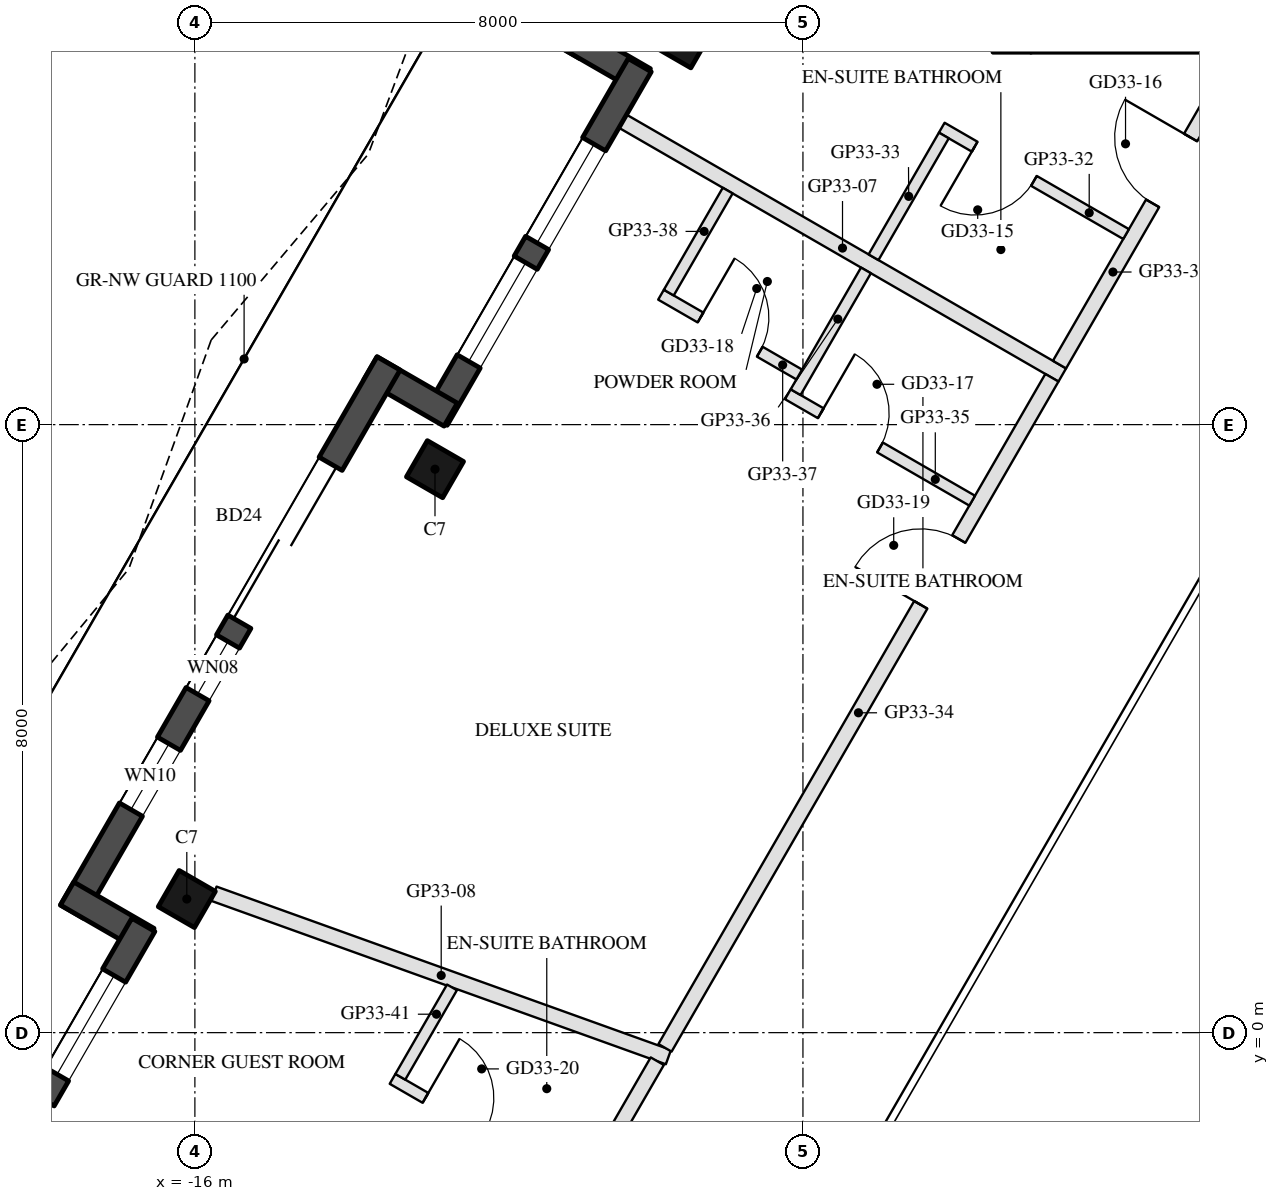
"""IFC4 building model, lengths in metres.
Left out: names, types, materials, properties, quantities, classifications, styles, units other than length and angle.
Written with IfcOpenShell. Run it as: python <this file> out.ifc"""

import sys

from ifc_helpers import new_model, si_unit, direction, frame, frame_2d, origin, origin_2d, place, context, subcontext, project, spatial, rectangle, hollow_rectangle, extrude, boolean, halfspace, element, fill, save


model = new_model("IFC4")
c1 = context("Model", 3, precision=1e-05, world=origin(), true_north=direction((0.0, 1.0)))
c2 = subcontext(c1, "Body", "Model", "MODEL_VIEW")
j1 = project(units=[si_unit("LENGTHUNIT", "METRE"), si_unit("PLANEANGLEUNIT", "RADIAN")], contexts=[c1])
p1 = place(None, origin())
s1 = spatial("IfcSite", under=j1, at=p1, CompositionType="ELEMENT")
p2 = place(p1, origin())
s2 = spatial("IfcBuilding", under=s1, at=p2, CompositionType="ELEMENT")
p3 = place(p2, frame((0.0, 0.0, 317.0)))
s3 = spatial("IfcBuildingStorey", under=s2, at=p3, CompositionType="ELEMENT", Elevation=317.0)
p4 = place(p3, frame((-9.576, 13.07, 0.0), z_axis=(0.0, 0.0, 1.0), x_axis=(0.5, 0.866025403784, 0.0)))
e1 = element("IfcColumn", 1, at=p4, inside=s3, PredefinedType="COLUMN", context=c2, shape_type="SweptSolid", body=[
    boolean("DIFFERENCE", extrude(hollow_rectangle(XDim=0.55, YDim=0.55, WallThickness=0.025, at=origin_2d()), origin(), (0.0, 0.0, 1.0), 3.7), halfspace(frame((0.0, 0.0, 3.666), z_axis=(0.0, 0.0, 1.0), x_axis=(1.0, 0.0, 0.0)), False)),
])
p5 = place(p3, frame((-12.841, 7.414, 0.0), z_axis=(0.0, 0.0, 1.0), x_axis=(0.5, 0.866025403784, 0.0)))
e2 = element("IfcColumn", 2, at=p5, inside=s3, PredefinedType="COLUMN", context=c2, shape_type="SweptSolid", body=[
    boolean("DIFFERENCE", extrude(hollow_rectangle(XDim=0.55, YDim=0.55, WallThickness=0.025, at=origin_2d()), origin(), (0.0, 0.0, 1.0), 3.7), halfspace(frame((0.0, 0.0, 3.668), z_axis=(0.0, 0.0, 1.0), x_axis=(1.0, 0.0, 0.0)), False)),
])
p6 = place(p3, frame((-16.106, 1.758, 0.0), z_axis=(0.0, 0.0, 1.0), x_axis=(0.5, 0.866025403784, 0.0)))
e3 = element("IfcColumn", 3, at=p6, inside=s3, PredefinedType="COLUMN", context=c2, shape_type="SweptSolid", body=[
    boolean("DIFFERENCE", extrude(hollow_rectangle(XDim=0.55, YDim=0.55, WallThickness=0.025, at=origin_2d()), origin(), (0.0, 0.0, 1.0), 3.7), halfspace(frame((0.0, 0.0, 3.666), z_axis=(0.0, 0.0, 1.0), x_axis=(1.0, 0.0, 0.0)), False)),
])
p7 = place(p3, frame((-6.125, 21.497, 0.0), z_axis=(0.0, 0.0, 1.0), x_axis=(-0.500002137087, -0.866024169933, 0.0)))
e4 = element("IfcWall", 4, at=p7, inside=s3, PredefinedType="SOLIDWALL", context=c2, shape_type="SweptSolid", body=[
    extrude(rectangle(XDim=9.924, YDim=0.35, at=frame_2d((4.962, 0.0))), origin(), (0.0, 0.0, 1.0), 3.55),
])
p8 = place(p7, frame((0.381, 0.0, 0.3)))
e5 = element("IfcOpeningElement", 5, at=p8, cuts=e4, PredefinedType="OPENING", context=c2, shape_type="SweptSolid", body=[
    extrude(rectangle(XDim=1.4, YDim=2.65, at=frame_2d((0.7, 1.325))), frame((0.0, 0.185, 0.0), z_axis=(0.0, -1.0, 0.0), x_axis=(1.0, 0.0, 0.0)), (0.0, 0.0, 1.0), 0.37),
])
p9 = place(p7, frame((5.999, 0.0, 0.0)))
e6 = element("IfcOpeningElement", 6, at=p9, cuts=e4, PredefinedType="OPENING", context=c2, shape_type="SweptSolid", body=[
    extrude(rectangle(XDim=2.4, YDim=2.4, at=frame_2d((1.2, 1.2))), frame((0.0, 0.185, 0.0), z_axis=(0.0, -1.0, 0.0), x_axis=(1.0, 0.0, 0.0)), (0.0, 0.0, 1.0), 0.37),
])
p10 = place(p7, frame((3.118, 0.0, 0.3)))
e7 = element("IfcOpeningElement", 7, at=p10, cuts=e4, PredefinedType="OPENING", context=c2, shape_type="SweptSolid", body=[
    extrude(rectangle(XDim=2.5, YDim=2.65, at=frame_2d((1.25, 1.325))), frame((0.0, 0.185, 0.0), z_axis=(0.0, -1.0, 0.0), x_axis=(1.0, 0.0, 0.0)), (0.0, 0.0, 1.0), 0.37),
])
p11 = place(p3, frame((-11.151, 13.142, 0.0), z_axis=(0.0, 0.0, 1.0), x_axis=(0.866005645448, -0.500034220881, 0.0)))
e8 = element("IfcWall", 8, at=p11, inside=s3, PredefinedType="SOLIDWALL", context=c2, shape_type="SweptSolid", body=[
    extrude(rectangle(XDim=1.22, YDim=0.35, at=frame_2d((0.61, 0.0))), origin(), (0.0, 0.0, 1.0), 3.55),
])
p12 = place(p3, frame((-10.147, 12.73, 0.0), z_axis=(0.0, 0.0, 1.0), x_axis=(-0.499996591357, -0.866027371756, 0.0)))
e9 = element("IfcWall", 9, at=p12, inside=s3, PredefinedType="SOLIDWALL", context=c2, shape_type="SweptSolid", body=[
    extrude(rectangle(XDim=5.371, YDim=0.35, at=frame_2d((2.685, 0.0))), origin(), (0.0, 0.0, 1.0), 3.55),
])
p13 = place(p12, frame((1.201, 0.0, 0.3)))
e10 = element("IfcOpeningElement", 10, at=p13, cuts=e9, PredefinedType="OPENING", context=c2, shape_type="SweptSolid", body=[
    extrude(rectangle(XDim=1.5, YDim=2.65, at=frame_2d((0.75, 1.325))), frame((0.0, 0.185, 0.0), z_axis=(0.0, -1.0, 0.0), x_axis=(1.0, 0.0, 0.0)), (0.0, 0.0, 1.0), 0.37),
])
p14 = place(p12, frame((3.001, 0.0, 0.3)))
e11 = element("IfcOpeningElement", 11, at=p14, cuts=e9, PredefinedType="OPENING", context=c2, shape_type="SweptSolid", body=[
    extrude(rectangle(XDim=1.5, YDim=2.65, at=frame_2d((0.75, 1.325))), frame((0.0, 0.185, 0.0), z_axis=(0.0, -1.0, 0.0), x_axis=(1.0, 0.0, 0.0)), (0.0, 0.0, 1.0), 0.37),
])
p15 = place(p3, frame((-12.634, 8.132, 0.0), z_axis=(0.0, 0.0, 1.0), x_axis=(-0.866005645448, 0.500034220881, 0.0)))
e12 = element("IfcWall", 12, at=p15, inside=s3, PredefinedType="SOLIDWALL", context=c2, shape_type="SweptSolid", body=[
    extrude(rectangle(XDim=1.22, YDim=0.35, at=frame_2d((0.61, 0.0))), origin(), (0.0, 0.0, 1.0), 3.55),
])
p16 = place(p3, frame((-13.452, 8.806, 0.0), z_axis=(0.0, 0.0, 1.0), x_axis=(-0.499993893925, -0.8660289291, 0.0)))
e13 = element("IfcWall", 13, at=p16, inside=s3, PredefinedType="SOLIDWALL", context=c2, shape_type="SweptSolid", body=[
    extrude(rectangle(XDim=8.331, YDim=0.35, at=frame_2d((4.165, 0.0))), origin(), (0.0, 0.0, 1.0), 3.55),
])
p17 = place(p16, frame((1.525, 0.0, 0.0)))
e14 = element("IfcOpeningElement", 14, at=p17, cuts=e13, PredefinedType="OPENING", context=c2, shape_type="SweptSolid", body=[
    extrude(rectangle(XDim=2.4, YDim=2.4, at=frame_2d((1.2, 1.2))), frame((0.0, 0.185, 0.0), z_axis=(0.0, -1.0, 0.0), x_axis=(1.0, 0.0, 0.0)), (0.0, 0.0, 1.0), 0.37),
])
p18 = place(p16, frame((4.225, 0.0, 0.3)))
e15 = element("IfcOpeningElement", 15, at=p18, cuts=e13, PredefinedType="OPENING", context=c2, shape_type="SweptSolid", body=[
    extrude(rectangle(XDim=0.8, YDim=2.65, at=frame_2d((0.4, 1.325))), frame((0.0, 0.185, 0.0), z_axis=(0.0, -1.0, 0.0), x_axis=(1.0, 0.0, 0.0)), (0.0, 0.0, 1.0), 0.37),
])
p19 = place(p16, frame((5.779, 0.0, 0.3)))
e16 = element("IfcOpeningElement", 16, at=p19, cuts=e13, PredefinedType="OPENING", context=c2, shape_type="SweptSolid", body=[
    extrude(rectangle(XDim=1.0, YDim=2.65, at=frame_2d((0.5, 1.325))), frame((0.0, 0.185, 0.0), z_axis=(0.0, -1.0, 0.0), x_axis=(1.0, 0.0, 0.0)), (0.0, 0.0, 1.0), 0.37),
])
p20 = place(p3, frame((-17.681, 1.83, 0.0), z_axis=(0.0, 0.0, 1.0), x_axis=(0.866092288191, -0.499884134912, 0.0)))
e17 = element("IfcWall", 17, at=p20, inside=s3, PredefinedType="SOLIDWALL", context=c2, shape_type="SweptSolid", body=[
    extrude(rectangle(XDim=1.22, YDim=0.35, at=frame_2d((0.61, 0.0))), origin(), (0.0, 0.0, 1.0), 3.55),
])
p21 = place(p3, frame((-16.678, 1.418, 0.0), z_axis=(0.0, 0.0, 1.0), x_axis=(-0.499996591357, -0.866027371756, 0.0)))
e18 = element("IfcWall", 18, at=p21, inside=s3, PredefinedType="SOLIDWALL", context=c2, shape_type="SweptSolid", body=[
    extrude(rectangle(XDim=5.371, YDim=0.35, at=frame_2d((2.685, 0.0))), origin(), (0.0, 0.0, 1.0), 3.55),
])
p22 = place(p21, frame((2.651, 0.0, 0.0)))
e19 = element("IfcOpeningElement", 19, at=p22, cuts=e18, PredefinedType="OPENING", context=c2, shape_type="SweptSolid", body=[
    extrude(rectangle(XDim=2.4, YDim=2.4, at=frame_2d((1.2, 1.2))), frame((0.0, 0.185, 0.0), z_axis=(0.0, -1.0, 0.0), x_axis=(1.0, 0.0, 0.0)), (0.0, 0.0, 1.0), 0.37),
])
p23 = place(p21, frame((0.77, 0.0, 0.3)))
e20 = element("IfcOpeningElement", 20, at=p23, cuts=e18, PredefinedType="OPENING", context=c2, shape_type="SweptSolid", body=[
    extrude(rectangle(XDim=1.5, YDim=2.65, at=frame_2d((0.75, 1.325))), frame((0.0, 0.185, 0.0), z_axis=(0.0, -1.0, 0.0), x_axis=(1.0, 0.0, 0.0)), (0.0, 0.0, 1.0), 0.37),
])
p24 = place(p3, frame((-5.25, 12.9, 0.0), z_axis=(0.0, 0.0, 1.0), x_axis=(0.0, 1.0, 0.0)))
e21 = element("IfcWall", 21, at=p24, inside=s3, PredefinedType="SHEAR", context=c2, shape_type="SweptSolid", body=[
    extrude(rectangle(XDim=9.283, YDim=0.5, at=frame_2d((4.641, 0.0))), origin(), (0.0, 0.0, 1.0), 3.5),
])
p25 = place(p3, frame((5.0, 13.1, 0.0), z_axis=(0.0, 0.0, 1.0), x_axis=(-1.0, 0.0, 0.0)))
e22 = element("IfcWall", 22, at=p25, inside=s3, PredefinedType="SHEAR", context=c2, shape_type="SweptSolid", body=[
    extrude(rectangle(XDim=10.0, YDim=0.4, at=frame_2d((5.0, 0.0))), origin(), (0.0, 0.0, 1.0), 3.5),
])
p26 = place(p25, frame((3.55, 0.0, 0.0)))
e23 = element("IfcOpeningElement", 23, at=p26, cuts=e22, PredefinedType="OPENING", context=c2, shape_type="SweptSolid", body=[
    extrude(rectangle(XDim=1.1, YDim=2.1, at=frame_2d((0.55, 1.05))), frame((0.0, 0.21, 0.0), z_axis=(0.0, -1.0, 0.0), x_axis=(1.0, 0.0, 0.0)), (0.0, 0.0, 1.0), 0.42),
])
p27 = place(p25, frame((5.85, 0.0, 0.0)))
e24 = element("IfcOpeningElement", 24, at=p27, cuts=e22, PredefinedType="OPENING", context=c2, shape_type="SweptSolid", body=[
    extrude(rectangle(XDim=1.4, YDim=2.1, at=frame_2d((0.7, 1.05))), frame((0.0, 0.21, 0.0), z_axis=(0.0, -1.0, 0.0), x_axis=(1.0, 0.0, 0.0)), (0.0, 0.0, 1.0), 0.42),
])
p28 = place(p3, frame((-10.371, 11.992, 0.0), z_axis=(0.0, 0.0, 1.0), x_axis=(0.866020588255, -0.50000834065, 0.0)))
e25 = element("IfcWall", 25, at=p28, inside=s3, PredefinedType="PARTITIONING", context=c2, shape_type="SweptSolid", body=[
    extrude(rectangle(XDim=6.678, YDim=0.2, at=frame_2d((3.339, 0.0))), origin(), (0.0, 0.0, 1.0), 3.1),
])
p29 = place(p3, frame((-15.749, 1.827, 0.0), z_axis=(0.0, 0.0, 1.0), x_axis=(0.941030372408, -0.3383220924, 0.0)))
e26 = element("IfcWall", 26, at=p29, inside=s3, PredefinedType="PARTITIONING", context=c2, shape_type="SweptSolid", body=[
    extrude(rectangle(XDim=6.353, YDim=0.2, at=frame_2d((3.177, 0.0))), origin(), (0.0, 0.0, 1.0), 3.1),
])
p30 = place(p3, frame((-4.625, 8.79, 0.0), z_axis=(0.0, 0.0, 1.0), x_axis=(0.499964368059, 0.866045974918, 0.0)))
e27 = element("IfcWall", 27, at=p30, inside=s3, PredefinedType="PARTITIONING", context=c2, shape_type="SweptSolid", body=[
    extrude(rectangle(XDim=4.688, YDim=0.2, at=frame_2d((2.344, 0.0))), origin(), (0.0, 0.0, 1.0), 3.1),
])
p31 = place(p30, frame((2.45, 0.0, 0.0)))
e28 = element("IfcOpeningElement", 28, at=p31, cuts=e27, PredefinedType="OPENING", context=c2, shape_type="SweptSolid", body=[
    extrude(rectangle(XDim=1.0, YDim=2.1, at=frame_2d((0.5, 1.05))), frame((0.0, 0.11, 0.0), z_axis=(0.0, -1.0, 0.0), x_axis=(1.0, 0.0, 0.0)), (0.0, 0.0, 1.0), 0.22),
])
p32 = place(p3, frame((-3.749, 10.507, 0.0), z_axis=(0.0, 0.0, 1.0), x_axis=(-0.866034573852, 0.49998411664, 0.0)))
e29 = element("IfcWall", 29, at=p32, inside=s3, PredefinedType="PARTITIONING", context=c2, shape_type="SweptSolid", body=[
    extrude(rectangle(XDim=2.8, YDim=0.15, at=frame_2d((1.4, 0.0))), origin(), (0.0, 0.0, 1.0), 3.55),
])
p33 = place(p32, frame((1.4, 0.0, 0.0)))
e30 = element("IfcOpeningElement", 30, at=p33, cuts=e29, PredefinedType="OPENING", context=c2, shape_type="SweptSolid", body=[
    extrude(rectangle(XDim=0.9, YDim=2.1, at=frame_2d((0.45, 1.05))), frame((0.0, 0.085, 0.0), z_axis=(0.0, -1.0, 0.0), x_axis=(1.0, 0.0, 0.0)), (0.0, 0.0, 1.0), 0.17),
])
p34 = place(p3, frame((-6.146, 11.805, 0.0), z_axis=(0.0, 0.0, 1.0), x_axis=(-0.499985172903, -0.866033964044, 0.0)))
e31 = element("IfcWall", 31, at=p34, inside=s3, PredefinedType="PARTITIONING", context=c2, shape_type="SweptSolid", body=[
    extrude(rectangle(XDim=1.85, YDim=0.15, at=frame_2d((0.925, 0.0))), origin(), (0.0, 0.0, 1.0), 3.1),
])
p35 = place(p3, frame((-9.815, -0.2, 0.0), z_axis=(0.0, 0.0, 1.0), x_axis=(0.499995091154, 0.866028237889, 0.0)))
e32 = element("IfcWall", 32, at=p35, inside=s3, PredefinedType="PARTITIONING", context=c2, shape_type="SweptSolid", body=[
    extrude(rectangle(XDim=10.18, YDim=0.2, at=frame_2d((5.09, 0.0))), origin(), (0.0, 0.0, 1.0), 3.1),
])
p36 = place(p35, frame((6.73, 0.0, 0.0)))
e33 = element("IfcOpeningElement", 33, at=p36, cuts=e32, PredefinedType="OPENING", context=c2, shape_type="SweptSolid", body=[
    extrude(rectangle(XDim=1.0, YDim=2.1, at=frame_2d((0.5, 1.05))), frame((0.0, 0.11, 0.0), z_axis=(0.0, -1.0, 0.0), x_axis=(1.0, 0.0, 0.0)), (0.0, 0.0, 1.0), 0.22),
])
p37 = place(p3, frame((-8.198, 8.4, 0.0), z_axis=(0.0, 0.0, 1.0), x_axis=(0.865996816683, -0.500049511043, 0.0)))
e34 = element("IfcWall", 34, at=p37, inside=s3, PredefinedType="PARTITIONING", context=c2, shape_type="SweptSolid", body=[
    extrude(rectangle(XDim=2.8, YDim=0.15, at=frame_2d((1.4, 0.0))), origin(), (0.0, 0.0, 1.0), 3.1),
])
p38 = place(p37, frame((0.5, 0.0, 0.0)))
e35 = element("IfcOpeningElement", 35, at=p38, cuts=e34, PredefinedType="OPENING", context=c2, shape_type="SweptSolid", body=[
    extrude(rectangle(XDim=0.9, YDim=2.1, at=frame_2d((0.45, 1.05))), frame((0.0, 0.085, 0.0), z_axis=(0.0, -1.0, 0.0), x_axis=(1.0, 0.0, 0.0)), (0.0, 0.0, 1.0), 0.17),
])
p39 = place(p3, frame((-7.171, 10.029, 0.0), z_axis=(0.0, 0.0, 1.0), x_axis=(-0.499985172903, -0.866033964044, 0.0)))
e36 = element("IfcWall", 36, at=p39, inside=s3, PredefinedType="PARTITIONING", context=c2, shape_type="SweptSolid", body=[
    extrude(rectangle(XDim=1.85, YDim=0.15, at=frame_2d((0.925, 0.0))), origin(), (0.0, 0.0, 1.0), 3.1),
])
p40 = place(p3, frame((-9.867, 9.709, 0.0), z_axis=(0.0, 0.0, 1.0), x_axis=(0.866009402589, -0.500027713859, 0.0)))
e37 = element("IfcWall", 37, at=p40, inside=s3, PredefinedType="PARTITIONING", context=c2, shape_type="SweptSolid", body=[
    extrude(rectangle(XDim=2.1, YDim=0.15, at=frame_2d((1.05, 0.0))), origin(), (0.0, 0.0, 1.0), 3.55),
])
p41 = place(p40, frame((0.6, 0.0, 0.0)))
e38 = element("IfcOpeningElement", 38, at=p41, cuts=e37, PredefinedType="OPENING", context=c2, shape_type="SweptSolid", body=[
    extrude(rectangle(XDim=0.9, YDim=2.1, at=frame_2d((0.45, 1.05))), frame((0.0, 0.085, 0.0), z_axis=(0.0, -1.0, 0.0), x_axis=(1.0, 0.0, 0.0)), (0.0, 0.0, 1.0), 0.17),
])
p42 = place(p3, frame((-8.99, 11.079, 0.0), z_axis=(0.0, 0.0, 1.0), x_axis=(-0.500086022567, -0.865975732936, 0.0)))
e39 = element("IfcWall", 39, at=p42, inside=s3, PredefinedType="PARTITIONING", context=c2, shape_type="SweptSolid", body=[
    extrude(rectangle(XDim=1.55, YDim=0.15, at=frame_2d((0.775, 0.0))), origin(), (0.0, 0.0, 1.0), 3.55),
])
p43 = place(p3, frame((-12.269, -4.45, 0.0), z_axis=(0.0, 0.0, 1.0), x_axis=(0.500006955494, 0.866021387991, 0.0)))
e40 = element("IfcWall", 40, at=p43, inside=s3, PredefinedType="PARTITIONING", context=c2, shape_type="SweptSolid", body=[
    extrude(rectangle(XDim=4.705, YDim=0.2, at=frame_2d((2.352, 0.0))), origin(), (0.0, 0.0, 1.0), 3.1),
])
p44 = place(p43, frame((1.237, 0.0, 0.0)))
e41 = element("IfcOpeningElement", 41, at=p44, cuts=e40, PredefinedType="OPENING", context=c2, shape_type="SweptSolid", body=[
    extrude(rectangle(XDim=1.0, YDim=2.1, at=frame_2d((0.5, 1.05))), frame((0.0, 0.11, 0.0), z_axis=(0.0, -1.0, 0.0), x_axis=(1.0, 0.0, 0.0)), (0.0, 0.0, 1.0), 0.22),
])
p45 = place(p3, frame((-13.399, -0.608, 0.0), z_axis=(0.0, 0.0, 1.0), x_axis=(0.866034573852, -0.49998411664, 0.0)))
e42 = element("IfcWall", 42, at=p45, inside=s3, PredefinedType="PARTITIONING", context=c2, shape_type="SweptSolid", body=[
    extrude(rectangle(XDim=2.8, YDim=0.15, at=frame_2d((1.4, 0.0))), origin(), (0.0, 0.0, 1.0), 3.55),
])
p46 = place(p45, frame((0.5, 0.0, 0.0)))
e43 = element("IfcOpeningElement", 43, at=p46, cuts=e42, PredefinedType="OPENING", context=c2, shape_type="SweptSolid", body=[
    extrude(rectangle(XDim=0.9, YDim=2.1, at=frame_2d((0.45, 1.05))), frame((0.0, 0.085, 0.0), z_axis=(0.0, -1.0, 0.0), x_axis=(1.0, 0.0, 0.0)), (0.0, 0.0, 1.0), 0.17),
])
p47 = place(p3, frame((-12.618, 0.595, 0.0), z_axis=(0.0, 0.0, 1.0), x_axis=(-0.499966175448, -0.866044931518, 0.0)))
e44 = element("IfcWall", 44, at=p47, inside=s3, PredefinedType="PARTITIONING", context=c2, shape_type="SweptSolid", body=[
    extrude(rectangle(XDim=1.358, YDim=0.15, at=frame_2d((0.679, 0.0))), origin(), (0.0, 0.0, 1.0), 3.1),
])
p48 = place(p13, origin())
e45 = element("IfcWindow", 45, at=p48, inside=s3, PartitioningType="SINGLE_PANEL", PredefinedType="WINDOW", context=c2, shape_type="SweptSolid", body=[
    extrude(rectangle(XDim=1.5, YDim=2.65, at=frame_2d((0.75, 1.325))), frame((0.0, 0.03, 0.0), z_axis=(0.0, -1.0, 0.0), x_axis=(1.0, 0.0, 0.0)), (0.0, 0.0, 1.0), 0.06),
])
fill(e10, e45)
p49 = place(p14, origin())
e46 = element("IfcWindow", 46, at=p49, inside=s3, PartitioningType="SINGLE_PANEL", PredefinedType="WINDOW", context=c2, shape_type="SweptSolid", body=[
    extrude(rectangle(XDim=1.5, YDim=2.65, at=frame_2d((0.75, 1.325))), frame((0.0, 0.03, 0.0), z_axis=(0.0, -1.0, 0.0), x_axis=(1.0, 0.0, 0.0)), (0.0, 0.0, 1.0), 0.06),
])
fill(e11, e46)
p50 = place(p17, frame((2.4, 0.0, 0.0), z_axis=(0.0, 0.0, 1.0), x_axis=(-1.0, 0.0, 0.0)))
e47 = element("IfcDoor", 47, at=p50, inside=s3, OperationType="SLIDING_TO_LEFT", PredefinedType="DOOR", context=c2, shape_type="SweptSolid", body=[
    extrude(rectangle(XDim=2.4, YDim=2.4, at=frame_2d((1.2, 1.2))), frame((0.0, 0.025, 0.0), z_axis=(0.0, -1.0, 0.0), x_axis=(1.0, 0.0, 0.0)), (0.0, 0.0, 1.0), 0.05),
])
fill(e14, e47)
p51 = place(p18, origin())
e48 = element("IfcWindow", 48, at=p51, inside=s3, PartitioningType="SINGLE_PANEL", PredefinedType="WINDOW", context=c2, shape_type="SweptSolid", body=[
    extrude(rectangle(XDim=0.8, YDim=2.65, at=frame_2d((0.4, 1.325))), frame((0.0, 0.03, 0.0), z_axis=(0.0, -1.0, 0.0), x_axis=(1.0, 0.0, 0.0)), (0.0, 0.0, 1.0), 0.06),
])
fill(e15, e48)
p52 = place(p19, origin())
e49 = element("IfcWindow", 49, at=p52, inside=s3, PartitioningType="SINGLE_PANEL", PredefinedType="WINDOW", context=c2, shape_type="SweptSolid", body=[
    extrude(rectangle(XDim=1.0, YDim=2.65, at=frame_2d((0.5, 1.325))), frame((0.0, 0.03, 0.0), z_axis=(0.0, -1.0, 0.0), x_axis=(1.0, 0.0, 0.0)), (0.0, 0.0, 1.0), 0.06),
])
fill(e16, e49)
p53 = place(p23, origin())
e50 = element("IfcWindow", 50, at=p53, inside=s3, PartitioningType="SINGLE_PANEL", PredefinedType="WINDOW", context=c2, shape_type="SweptSolid", body=[
    extrude(rectangle(XDim=1.5, YDim=2.65, at=frame_2d((0.75, 1.325))), frame((0.0, 0.03, 0.0), z_axis=(0.0, -1.0, 0.0), x_axis=(1.0, 0.0, 0.0)), (0.0, 0.0, 1.0), 0.06),
])
fill(e20, e50)
p54 = place(p33, origin())
e51 = element("IfcDoor", 51, at=p54, inside=s3, OperationType="SINGLE_SWING_RIGHT", PredefinedType="DOOR", context=c2, shape_type="SweptSolid", body=[
    extrude(rectangle(XDim=0.9, YDim=2.1, at=frame_2d((0.45, 1.05))), frame((0.0, 0.025, 0.0), z_axis=(0.0, -1.0, 0.0), x_axis=(1.0, 0.0, 0.0)), (0.0, 0.0, 1.0), 0.05),
])
fill(e30, e51)
p55 = place(p31, origin())
e52 = element("IfcDoor", 52, at=p55, inside=s3, OperationType="SINGLE_SWING_RIGHT", PredefinedType="DOOR", context=c2, shape_type="SweptSolid", body=[
    extrude(rectangle(XDim=1.0, YDim=2.1, at=frame_2d((0.5, 1.05))), frame((0.0, 0.025, 0.0), z_axis=(0.0, -1.0, 0.0), x_axis=(1.0, 0.0, 0.0)), (0.0, 0.0, 1.0), 0.05),
])
fill(e28, e52)
p56 = place(p38, origin())
e53 = element("IfcDoor", 53, at=p56, inside=s3, OperationType="SINGLE_SWING_LEFT", PredefinedType="DOOR", context=c2, shape_type="SweptSolid", body=[
    extrude(rectangle(XDim=0.9, YDim=2.1, at=frame_2d((0.45, 1.05))), frame((0.0, 0.025, 0.0), z_axis=(0.0, -1.0, 0.0), x_axis=(1.0, 0.0, 0.0)), (0.0, 0.0, 1.0), 0.05),
])
fill(e35, e53)
p57 = place(p41, origin())
e54 = element("IfcDoor", 54, at=p57, inside=s3, OperationType="SINGLE_SWING_LEFT", PredefinedType="DOOR", context=c2, shape_type="SweptSolid", body=[
    extrude(rectangle(XDim=0.9, YDim=2.1, at=frame_2d((0.45, 1.05))), frame((0.0, 0.025, 0.0), z_axis=(0.0, -1.0, 0.0), x_axis=(1.0, 0.0, 0.0)), (0.0, 0.0, 1.0), 0.05),
])
fill(e38, e54)
p58 = place(p36, origin())
e55 = element("IfcDoor", 55, at=p58, inside=s3, OperationType="SINGLE_SWING_LEFT", PredefinedType="DOOR", context=c2, shape_type="SweptSolid", body=[
    extrude(rectangle(XDim=1.0, YDim=2.1, at=frame_2d((0.5, 1.05))), frame((0.0, 0.025, 0.0), z_axis=(0.0, -1.0, 0.0), x_axis=(1.0, 0.0, 0.0)), (0.0, 0.0, 1.0), 0.05),
])
fill(e33, e55)
p59 = place(p46, origin())
e56 = element("IfcDoor", 56, at=p59, inside=s3, OperationType="SINGLE_SWING_LEFT", PredefinedType="DOOR", context=c2, shape_type="SweptSolid", body=[
    extrude(rectangle(XDim=0.9, YDim=2.1, at=frame_2d((0.45, 1.05))), frame((0.0, 0.025, 0.0), z_axis=(0.0, -1.0, 0.0), x_axis=(1.0, 0.0, 0.0)), (0.0, 0.0, 1.0), 0.05),
])
fill(e43, e56)
save(model, sys.argv[1])
